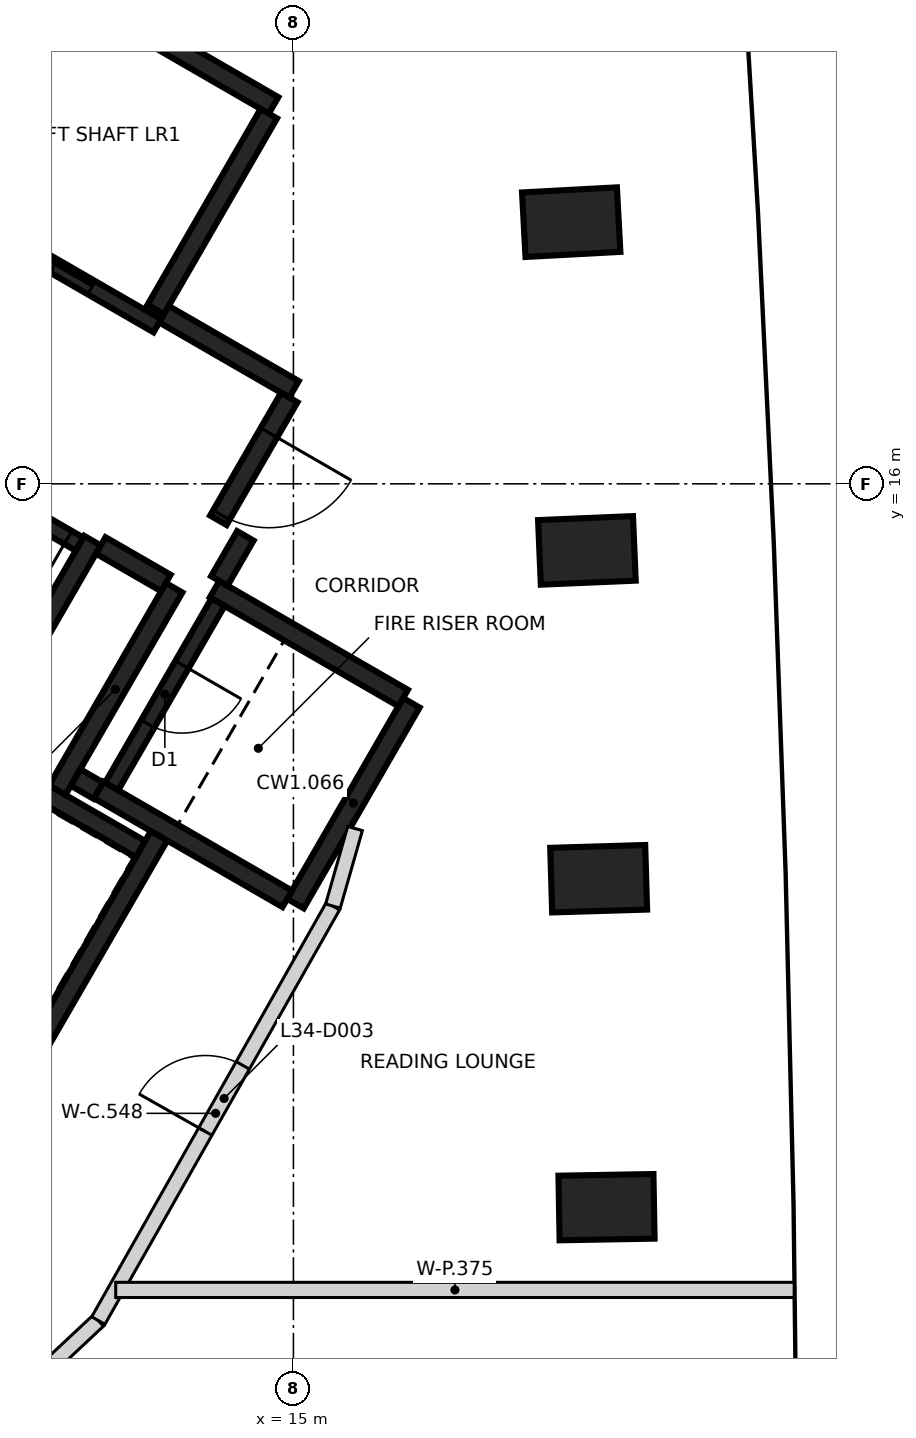
"""IFC4 building model, lengths in metres.
Left out: names, types, materials, properties, quantities, classifications, styles, units other than length and angle.
Written with IfcOpenShell. Run it as: python <this file> out.ifc"""

import sys

from ifc_helpers import new_model, si_unit, direction, frame, frame_2d, origin, origin_2d, place, context, subcontext, project, spatial, rectangle, extrude, element, fill, save


model = new_model("IFC4")
c1 = context("Model", 3, precision=1e-05, world=origin(), true_north=direction((0.0, 1.0)))
c2 = subcontext(c1, "Body", "Model", "MODEL_VIEW")
j1 = project(units=[si_unit("LENGTHUNIT", "METRE"), si_unit("PLANEANGLEUNIT", "RADIAN")], contexts=[c1])
p1 = place(None, origin())
s1 = spatial("IfcSite", under=j1, at=p1, CompositionType="ELEMENT")
p2 = place(p1, origin())
s2 = spatial("IfcBuilding", under=s1, at=p2, CompositionType="ELEMENT")
p3 = place(p2, frame((0.0, 0.0, 139.6)))
s3 = spatial("IfcBuildingStorey", under=s2, at=p3, CompositionType="ELEMENT", Elevation=139.6)
for number, where, z_axis, x_axis in (
    (1, (19.119, 6.484, -0.4), (0.0, 0.0, 1.0), (1.0, 0.018, 0.0)),
    (2, (19.016, 10.805, -0.4), (0.0, 0.0, 1.0), (1.0, 0.03, 0.0)),
    (3, (18.861, 15.124, -0.4), (0.0, 0.0, 1.0), (0.999, 0.042, 0.0)),
    (4, (18.655, 19.442, -0.4), (0.0, 0.0, 1.0), (0.999, 0.054, 0.0)),
):
    element("IfcColumn", number, at=place(p3, frame(where, z_axis=z_axis, x_axis=x_axis)), inside=s3, PredefinedType="COLUMN", context=c2, shape_type="SweptSolid", body=[
        extrude(rectangle(XDim=1.25, YDim=0.85, at=origin_2d()), origin(), (0.0, 0.0, 1.0), 3.6),
    ])
p4 = place(p3, frame((9.673, 23.903, 0.0), z_axis=(0.0, 0.0, 1.0), x_axis=(0.86603616409, -0.499981362141, 0.0)))
e5 = element("IfcWall", 5, at=p4, inside=s3, PredefinedType="SHEAR", context=c2, shape_type="SweptSolid", body=[
    extrude(rectangle(XDim=5.85, YDim=0.25, at=frame_2d((2.925, 0.0))), origin(), (0.0, 0.0, 1.0), 3.2),
])
p5 = place(p3, frame((13.238, 11.378, 0.0), z_axis=(0.0, 0.0, 1.0), x_axis=(-0.500008851346, -0.866020293397, 0.0)))
e6 = element("IfcWall", 6, at=p5, inside=s3, PredefinedType="SHEAR", context=c2, shape_type="SweptSolid", body=[
    extrude(rectangle(XDim=5.51, YDim=0.25, at=frame_2d((2.755, 0.0))), origin(), (0.0, 0.0, 1.0), 3.2),
])
p6 = place(p3, frame((12.357, 15.252, 0.0), z_axis=(0.0, 0.0, 1.0), x_axis=(-0.500028443584, -0.866008981251, 0.0)))
e7 = element("IfcWall", 7, at=p6, inside=s3, PredefinedType="SHEAR", context=c2, shape_type="SweptSolid", body=[
    extrude(rectangle(XDim=3.2, YDim=0.25, at=frame_2d((1.6, 0.0))), origin(), (0.0, 0.0, 1.0), 3.2),
])
p7 = place(p3, frame((14.676, 20.87, 0.0), z_axis=(0.0, 0.0, 1.0), x_axis=(-0.499987686533, -0.866032512851, 0.0)))
e8 = element("IfcWall", 8, at=p7, inside=s3, PredefinedType="SHEAR", context=c2, shape_type="SweptSolid", body=[
    extrude(rectangle(XDim=2.975, YDim=0.25, at=frame_2d((1.487, 0.0))), origin(), (0.0, 0.0, 1.0), 3.2),
])
p8 = place(p3, frame((16.552, 13.119, 0.0), z_axis=(0.0, 0.0, 1.0), x_axis=(-0.499978833458, -0.866037623948, 0.0)))
e9 = element("IfcWall", 9, at=p8, inside=s3, PredefinedType="SHEAR", context=c2, shape_type="SweptSolid", body=[
    extrude(rectangle(XDim=3.05, YDim=0.25, at=frame_2d((1.525, 0.0))), origin(), (0.0, 0.0, 1.0), 3.2),
])
p9 = place(p3, frame((14.918, 10.54, 0.0), z_axis=(0.0, 0.0, 1.0), x_axis=(-0.866063538972, 0.499933942099, 0.0)))
e10 = element("IfcWall", 10, at=p9, inside=s3, PredefinedType="SHEAR", context=c2, shape_type="SweptSolid", body=[
    extrude(rectangle(XDim=2.865, YDim=0.25, at=frame_2d((1.432, 0.0))), origin(), (0.0, 0.0, 1.0), 3.2),
])
p10 = place(p3, frame((13.963, 14.614, 0.0), z_axis=(0.0, 0.0, 1.0), x_axis=(0.866042235819, -0.499970844928, 0.0)))
e11 = element("IfcWall", 11, at=p10, inside=s3, PredefinedType="SHEAR", context=c2, shape_type="SweptSolid", body=[
    extrude(rectangle(XDim=2.865, YDim=0.25, at=frame_2d((1.432, 0.0))), origin(), (0.0, 0.0, 1.0), 3.2),
])
p11 = place(p3, frame((11.888, 11.961, 0.0), z_axis=(0.0, 0.0, 1.0), x_axis=(0.500003324108, 0.866023484601, 0.0)))
e12 = element("IfcWall", 12, at=p11, inside=s3, PredefinedType="SHEAR", context=c2, shape_type="SweptSolid", body=[
    extrude(rectangle(XDim=3.085, YDim=0.25, at=frame_2d((1.542, 0.0))), origin(), (0.0, 0.0, 1.0), 3.2),
])
p12 = place(p3, frame((10.865, 12.418, 0.0), z_axis=(0.0, 0.0, 1.0), x_axis=(0.866026229868, -0.499998569178, 0.0)))
e13 = element("IfcWall", 13, at=p12, inside=s3, PredefinedType="SHEAR", context=c2, shape_type="SweptSolid", body=[
    extrude(rectangle(XDim=2.449, YDim=0.25, at=frame_2d((1.225, 0.0))), origin(), (0.0, 0.0, 1.0), 3.2),
])
p13 = place(p3, frame((13.297, 18.231, 0.0), z_axis=(0.0, 0.0, 1.0), x_axis=(0.866043531843, -0.499968599967, 0.0)))
e14 = element("IfcWall", 14, at=p13, inside=s3, PredefinedType="SHEAR", context=c2, shape_type="SweptSolid", body=[
    extrude(rectangle(XDim=1.975, YDim=0.25, at=frame_2d((0.987, 0.0))), origin(), (0.0, 0.0, 1.0), 3.2),
])
p14 = place(p3, frame((14.945, 17.135, 0.0), z_axis=(0.0, 0.0, 1.0), x_axis=(-0.499983108224, -0.866035156036, 0.0)))
e15 = element("IfcWall", 15, at=p14, inside=s3, PredefinedType="SHEAR", context=c2, shape_type="SweptSolid", body=[
    extrude(rectangle(XDim=1.865, YDim=0.25, at=frame_2d((0.932, 0.0))), origin(), (0.0, 0.0, 1.0), 3.2),
])
p15 = place(p14, frame((0.535, 0.0, 0.0)))
e16 = element("IfcOpeningElement", 16, at=p15, cuts=e15, PredefinedType="OPENING", context=c2, shape_type="SweptSolid", body=[
    extrude(rectangle(XDim=1.25, YDim=2.1, at=frame_2d((0.625, 1.05))), frame((0.0, 0.135, 0.0), z_axis=(0.0, -1.0, 0.0), x_axis=(1.0, 0.0, 0.0)), (0.0, 0.0, 1.0), 0.27),
])
p16 = place(p3, frame((13.322, 14.695, 0.0), z_axis=(0.0, 0.0, 1.0), x_axis=(-0.866017078145, 0.500014420154, 0.0)))
e17 = element("IfcWall", 17, at=p16, inside=s3, PredefinedType="SHEAR", context=c2, shape_type="SweptSolid", body=[
    extrude(rectangle(XDim=0.989, YDim=0.25, at=frame_2d((0.495, 0.0))), origin(), (0.0, 0.0, 1.0), 3.2),
])
p17 = place(p3, frame((14.368, 15.315, 0.0), z_axis=(0.0, 0.0, 1.0), x_axis=(-0.499897359611, -0.866084655132, 0.0)))
e18 = element("IfcWall", 18, at=p17, inside=s3, PredefinedType="SHEAR", context=c2, shape_type="SweptSolid", body=[
    extrude(rectangle(XDim=0.685, YDim=0.25, at=frame_2d((0.342, 0.0))), origin(), (0.0, 0.0, 1.0), 3.2),
])
p18 = place(p3, frame((12.433, 11.964, 0.0), z_axis=(0.0, 0.0, 1.0), x_axis=(-0.866055875208, 0.499947218231, 0.0)))
e19 = element("IfcWall", 19, at=p18, inside=s3, PredefinedType="SHEAR", context=c2, shape_type="SweptSolid", body=[
    extrude(rectangle(XDim=0.345, YDim=0.25, at=frame_2d((0.172, 0.0))), origin(), (0.0, 0.0, 1.0), 3.2),
])
p19 = place(p3, frame((13.21, 18.08, 0.0), z_axis=(0.0, 0.0, 1.0), x_axis=(-0.866030299012, 0.499991521122, 0.0)))
e20 = element("IfcWall", 20, at=p19, inside=s3, PredefinedType="SHEAR", context=c2, shape_type="SweptSolid", body=[
    extrude(rectangle(XDim=6.1, YDim=0.2, at=frame_2d((3.05, 0.0))), origin(), (0.0, 0.0, 1.0), 3.2),
])
p20 = place(p19, frame((1.0, 0.0, 0.0)))
e21 = element("IfcOpeningElement", 21, at=p20, cuts=e20, PredefinedType="OPENING", context=c2, shape_type="SweptSolid", body=[
    extrude(rectangle(XDim=1.2, YDim=2.1, at=frame_2d((0.6, 1.05))), frame((0.0, 0.11, 0.0), z_axis=(0.0, -1.0, 0.0), x_axis=(1.0, 0.0, 0.0)), (0.0, 0.0, 1.0), 0.22),
])
p21 = place(p19, frame((4.05, 0.0, 0.0)))
e22 = element("IfcOpeningElement", 22, at=p21, cuts=e20, PredefinedType="OPENING", context=c2, shape_type="SweptSolid", body=[
    extrude(rectangle(XDim=1.2, YDim=2.1, at=frame_2d((0.6, 1.05))), frame((0.0, 0.11, 0.0), z_axis=(0.0, -1.0, 0.0), x_axis=(1.0, 0.0, 0.0)), (0.0, 0.0, 1.0), 0.22),
])
p22 = place(p3, frame((12.185, 15.207, 0.0), z_axis=(0.0, 0.0, 1.0), x_axis=(-0.866020080793, 0.500009219579, 0.0)))
e23 = element("IfcWall", 23, at=p22, inside=s3, PredefinedType="SHEAR", context=c2, shape_type="SweptSolid", body=[
    extrude(rectangle(XDim=5.699, YDim=0.2, at=frame_2d((2.85, 0.0))), origin(), (0.0, 0.0, 1.0), 3.2),
])
p23 = place(p22, frame((0.174, 0.0, 0.0)))
e24 = element("IfcOpeningElement", 24, at=p23, cuts=e23, PredefinedType="OPENING", context=c2, shape_type="SweptSolid", body=[
    extrude(rectangle(XDim=0.9, YDim=2.1, at=frame_2d((0.45, 1.05))), frame((0.0, 0.11, 0.0), z_axis=(0.0, -1.0, 0.0), x_axis=(1.0, 0.0, 0.0)), (0.0, 0.0, 1.0), 0.22),
])
p24 = place(p22, frame((4.599, 0.0, 0.0)))
e25 = element("IfcOpeningElement", 25, at=p24, cuts=e23, PredefinedType="OPENING", context=c2, shape_type="SweptSolid", body=[
    extrude(rectangle(XDim=0.9, YDim=2.1, at=frame_2d((0.45, 1.05))), frame((0.0, 0.11, 0.0), z_axis=(0.0, -1.0, 0.0), x_axis=(1.0, 0.0, 0.0)), (0.0, 0.0, 1.0), 0.22),
])
p25 = place(p3, frame((10.489, 19.767, 0.0), z_axis=(0.0, 0.0, 1.0), x_axis=(0.499946628782, 0.866056215479, 0.0)))
e26 = element("IfcWall", 26, at=p25, inside=s3, PredefinedType="SHEAR", context=c2, shape_type="SweptSolid", body=[
    extrude(rectangle(XDim=3.048, YDim=0.2, at=frame_2d((1.524, 0.0))), origin(), (0.0, 0.0, 1.0), 3.2),
])
p26 = place(p3, frame((14.008, 14.442, 0.0), z_axis=(0.0, 0.0, 1.0), x_axis=(-0.499986818241, -0.866033014143, 0.0)))
e27 = element("IfcWall", 27, at=p26, inside=s3, PredefinedType="SHEAR", context=c2, shape_type="SweptSolid", body=[
    extrude(rectangle(XDim=2.798, YDim=0.2, at=frame_2d((1.399, 0.0))), origin(), (0.0, 0.0, 1.0), 3.2),
])
p27 = place(p26, frame((0.949, 0.0, 0.0)))
e28 = element("IfcOpeningElement", 28, at=p27, cuts=e27, PredefinedType="OPENING", context=c2, shape_type="SweptSolid", body=[
    extrude(rectangle(XDim=0.9, YDim=2.1, at=frame_2d((0.45, 1.05))), frame((0.0, 0.11, 0.0), z_axis=(0.0, -1.0, 0.0), x_axis=(1.0, 0.0, 0.0)), (0.0, 0.0, 1.0), 0.22),
])
p28 = place(p3, frame((11.458, 4.078, 0.0), z_axis=(0.0, 0.0, 1.0), x_axis=(0.729936032318, 0.683515463412, 0.0)))
e29 = element("IfcWall", 29, at=p28, inside=s3, PredefinedType="PARTITIONING", context=c2, shape_type="SweptSolid", body=[
    extrude(rectangle(XDim=1.336, YDim=0.2, at=frame_2d((0.668, 0.0))), origin(), (0.0, 0.0, 1.0), 3.2),
])
p29 = place(p3, frame((12.433, 4.992, 0.0), z_axis=(0.0, 0.0, 1.0), x_axis=(0.492740203499, 0.870176471675, 0.0)))
e30 = element("IfcWall", 30, at=p29, inside=s3, PredefinedType="PARTITIONING", context=c2, shape_type="SweptSolid", body=[
    extrude(rectangle(XDim=6.265, YDim=0.2, at=frame_2d((3.133, 0.0))), origin(), (0.0, 0.0, 1.0), 3.2),
])
p30 = place(p29, frame((2.858, 0.0, 0.0)))
e31 = element("IfcOpeningElement", 31, at=p30, cuts=e30, PredefinedType="OPENING", context=c2, shape_type="SweptSolid", body=[
    extrude(rectangle(XDim=1.0, YDim=2.1, at=frame_2d((0.5, 1.05))), frame((0.0, 0.11, 0.0), z_axis=(0.0, -1.0, 0.0), x_axis=(1.0, 0.0, 0.0)), (0.0, 0.0, 1.0), 0.22),
])
p31 = place(p3, frame((15.52, 10.445, 0.0), z_axis=(0.0, 0.0, 1.0), x_axis=(0.274143458758, 0.961688808306, 0.0)))
e32 = element("IfcWall", 32, at=p31, inside=s3, PredefinedType="PARTITIONING", context=c2, shape_type="SweptSolid", body=[
    extrude(rectangle(XDim=1.061, YDim=0.2, at=frame_2d((0.53, 0.0))), origin(), (0.0, 0.0, 1.0), 3.2),
])
p32 = place(p3, frame((12.662, 5.395, 0.0), z_axis=(0.0, 0.0, 1.0), x_axis=(1.0, 0.0, 0.0)))
e33 = element("IfcWall", 33, at=p32, inside=s3, PredefinedType="PARTITIONING", context=c2, shape_type="SweptSolid", body=[
    extrude(rectangle(XDim=8.926, YDim=0.2, at=frame_2d((4.463, 0.0))), origin(), (0.0, 0.0, 1.0), 2.3),
])
p33 = place(p20, origin())
e34 = element("IfcDoor", 34, at=p33, inside=s3, OperationType="DOUBLE_DOOR_SLIDING", PredefinedType="DOOR", context=c2, shape_type="SweptSolid", body=[
    extrude(rectangle(XDim=1.2, YDim=2.1, at=frame_2d((0.6, 1.05))), frame((0.0, 0.025, 0.0), z_axis=(0.0, -1.0, 0.0), x_axis=(1.0, 0.0, 0.0)), (0.0, 0.0, 1.0), 0.05),
])
fill(e21, e34)
p34 = place(p15, origin())
e35 = element("IfcDoor", 35, at=p34, inside=s3, OperationType="SINGLE_SWING_LEFT", PredefinedType="DOOR", context=c2, shape_type="SweptSolid", body=[
    extrude(rectangle(XDim=1.25, YDim=2.1, at=frame_2d((0.625, 1.05))), frame((0.0, 0.025, 0.0), z_axis=(0.0, -1.0, 0.0), x_axis=(1.0, 0.0, 0.0)), (0.0, 0.0, 1.0), 0.05),
])
fill(e16, e35)
p35 = place(p23, origin())
e36 = element("IfcDoor", 36, at=p35, inside=s3, OperationType="SINGLE_SWING_LEFT", PredefinedType="DOOR", context=c2, shape_type="SweptSolid", body=[
    extrude(rectangle(XDim=0.9, YDim=2.1, at=frame_2d((0.45, 1.05))), frame((0.0, 0.025, 0.0), z_axis=(0.0, -1.0, 0.0), x_axis=(1.0, 0.0, 0.0)), (0.0, 0.0, 1.0), 0.05),
])
fill(e24, e36)
p36 = place(p27, origin())
e37 = element("IfcDoor", 37, at=p36, inside=s3, OperationType="SINGLE_SWING_LEFT", PredefinedType="DOOR", context=c2, shape_type="SweptSolid", body=[
    extrude(rectangle(XDim=0.9, YDim=2.1, at=frame_2d((0.45, 1.05))), frame((0.0, 0.025, 0.0), z_axis=(0.0, -1.0, 0.0), x_axis=(1.0, 0.0, 0.0)), (0.0, 0.0, 1.0), 0.05),
])
fill(e28, e37)
p37 = place(p30, frame((1.0, 0.0, 0.0), z_axis=(0.0, 0.0, 1.0), x_axis=(-1.0, 0.0, 0.0)))
e38 = element("IfcDoor", 38, at=p37, inside=s3, OperationType="SINGLE_SWING_LEFT", PredefinedType="DOOR", context=c2, shape_type="SweptSolid", body=[
    extrude(rectangle(XDim=1.0, YDim=2.1, at=frame_2d((0.5, 1.05))), frame((0.0, 0.025, 0.0), z_axis=(0.0, -1.0, 0.0), x_axis=(1.0, 0.0, 0.0)), (0.0, 0.0, 1.0), 0.05),
])
fill(e31, e38)
save(model, sys.argv[1])
